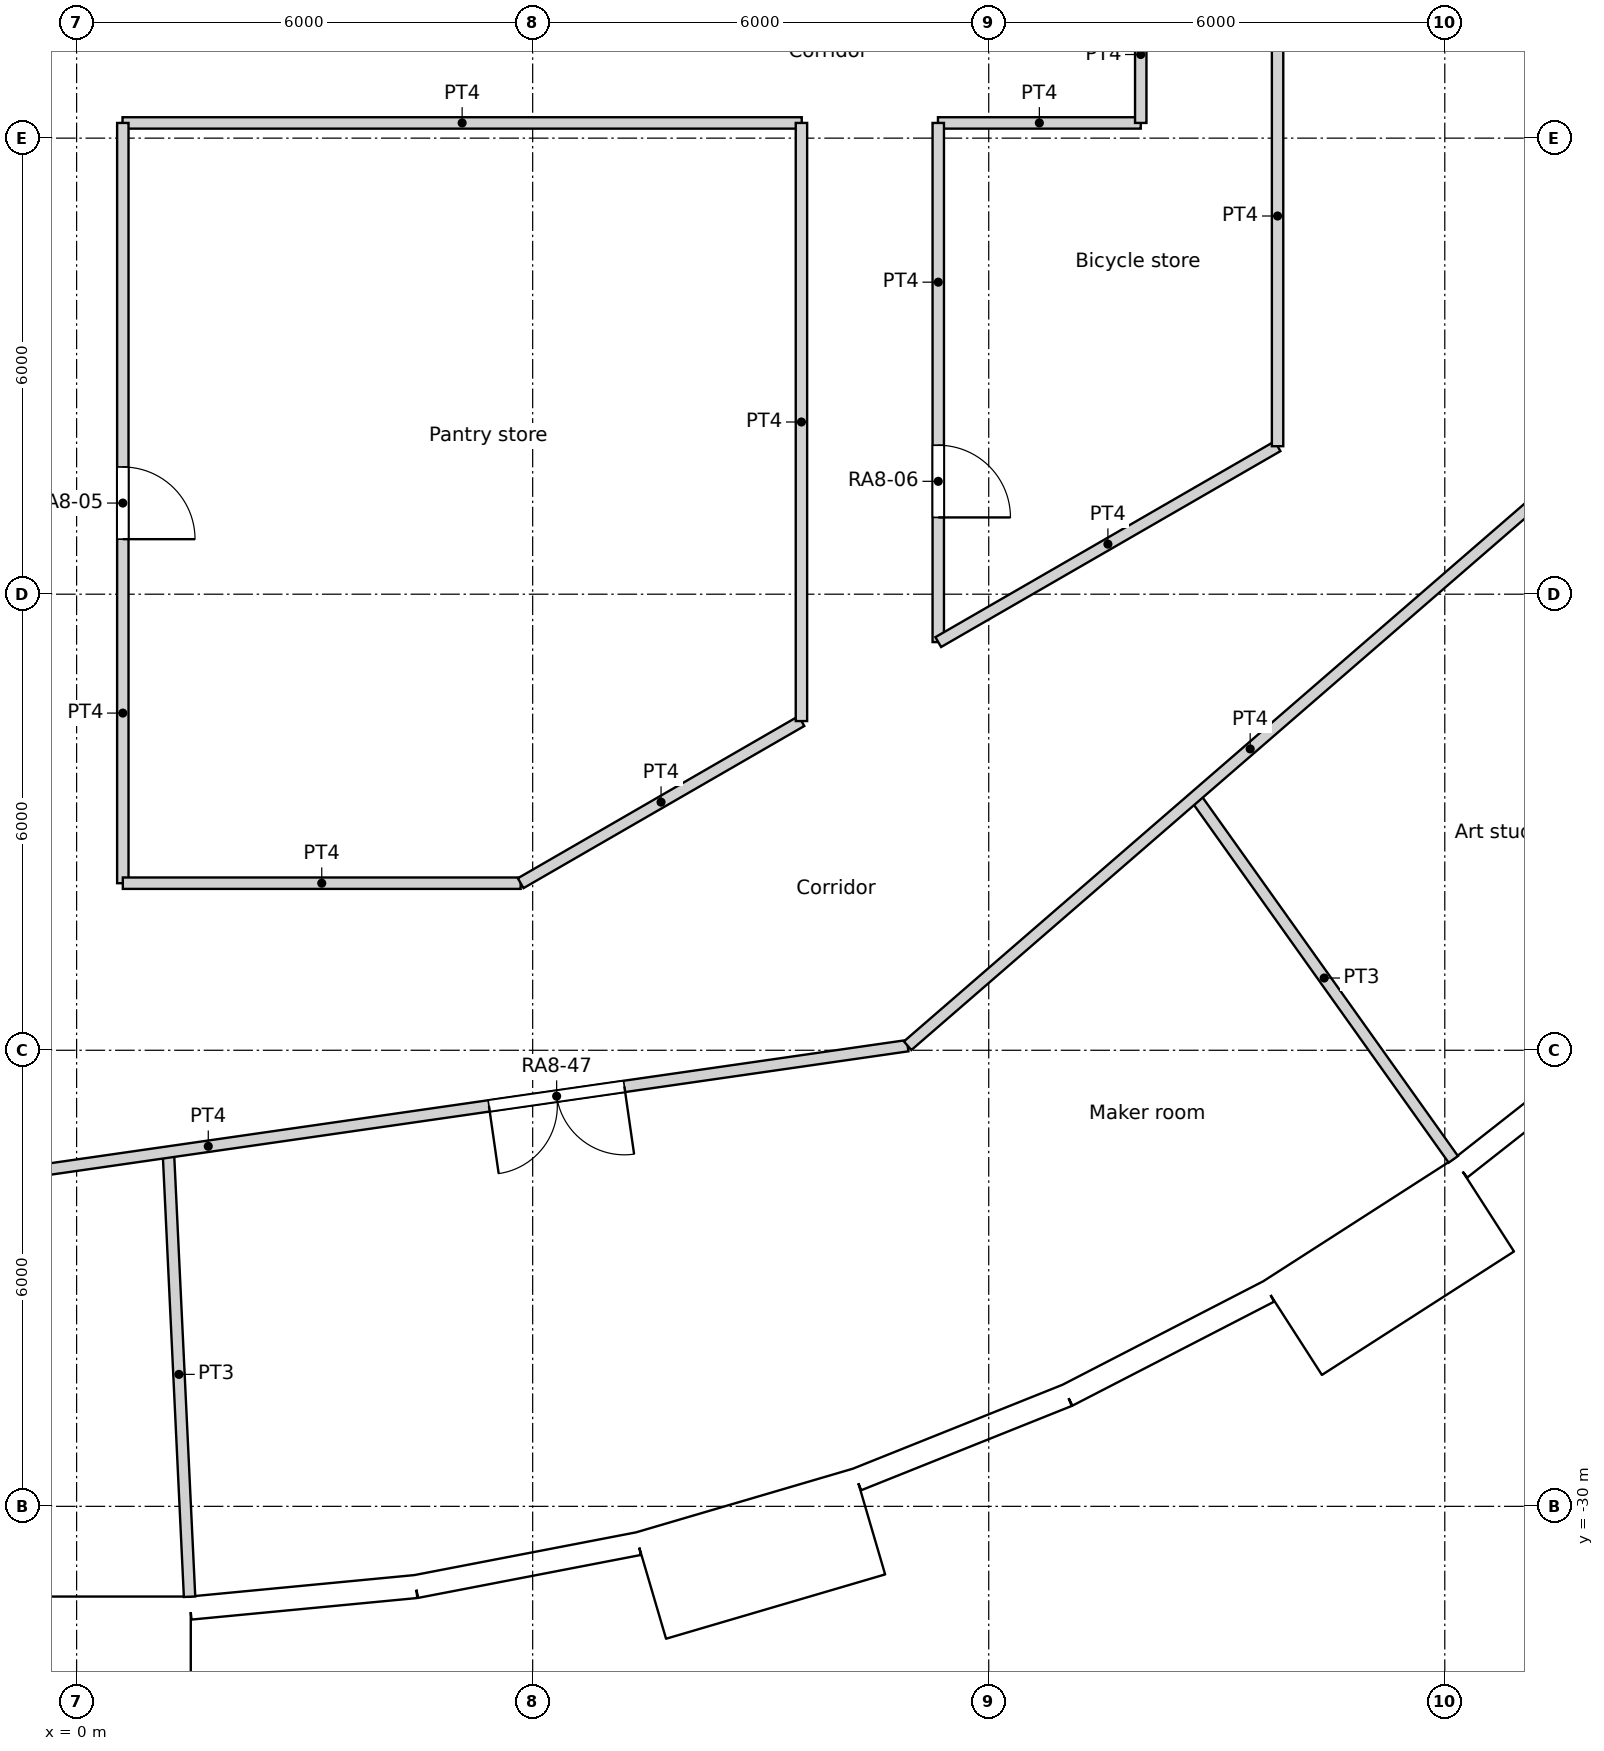
"""IFC4 building model, lengths in metres.
Left out: names, types, materials, properties, quantities, classifications, styles, units other than length and angle.
Written with IfcOpenShell. Run it as: python <this file> out.ifc"""

import sys

from ifc_helpers import new_model, si_unit, direction, frame, frame_2d, origin, origin_2d, place, context, subcontext, project, spatial, rectangle, circle, extrude, element, fill, save


model = new_model("IFC4")
c1 = context("Model", 3, precision=1e-05, world=origin(), true_north=direction((0.0, 1.0)))
c2 = subcontext(c1, "Body", "Model", "MODEL_VIEW")
j1 = project(units=[si_unit("LENGTHUNIT", "METRE"), si_unit("PLANEANGLEUNIT", "RADIAN")], contexts=[c1])
p1 = place(None, origin())
s1 = spatial("IfcSite", under=j1, at=p1, CompositionType="ELEMENT")
p2 = place(p1, origin())
s2 = spatial("IfcBuilding", under=s1, at=p2, CompositionType="ELEMENT")
p3 = place(p2, frame((0.0, 0.0, 103.8)))
s3 = spatial("IfcBuildingStorey", under=s2, at=p3, CompositionType="ELEMENT", Elevation=103.8)
for number, where, z_axis, x_axis in (
    (1, (1.44, -30.24, 0.0), (0.0, 0.0, 1.0), (1.0, 0.0, 0.0)),
    (2, (7.137, -29.421, 0.0), (0.0, 0.0, 1.0), (1.0, 0.0, 0.0)),
    (3, (12.576, -27.539, 0.0), (0.0, 0.0, 1.0), (1.0, 0.0, 0.0)),
    (4, (17.561, -24.661, 0.0), (0.0, 0.0, 1.0), (1.0, 0.0, 0.0)),
):
    element("IfcColumn", number, at=place(p3, frame(where, z_axis=z_axis, x_axis=x_axis)), inside=s3, PredefinedType="COLUMN", context=c2, shape_type="SweptSolid", body=[
        extrude(circle(Radius=0.6, at=origin_2d()), origin(), (0.0, 0.0, 1.0), 3.6),
    ])
for number, where, z_axis, x_axis in (
    (5, (4.263, -24.175, 0.0), (0.0, 0.0, 1.0), (1.0, 0.0, 0.0)),
    (6, (9.723, -22.54, 0.0), (0.0, 0.0, 1.0), (1.0, 0.0, 0.0)),
    (7, (14.659, -19.69, 0.0), (0.0, 0.0, 1.0), (1.0, 0.0, 0.0)),
    (8, (18.805, -15.779, 0.0), (0.0, 0.0, 1.0), (1.0, 0.0, 0.0)),
):
    element("IfcColumn", number, at=place(p3, frame(where, z_axis=z_axis, x_axis=x_axis)), inside=s3, PredefinedType="COLUMN", context=c2, shape_type="SweptSolid", body=[
        extrude(circle(Radius=0.65, at=origin_2d()), origin(), (0.0, 0.0, 1.0), 3.6),
    ])
for number, where, z_axis, x_axis in (
    (9, (1.406, -18.77, 0.0), (0.0, 0.0, 1.0), (1.0, 0.0, 0.0)),
    (10, (6.876, -17.521, 0.0), (0.0, 0.0, 1.0), (1.0, 0.0, 0.0)),
    (11, (11.735, -14.716, 0.0), (0.0, 0.0, 1.0), (1.0, 0.0, 0.0)),
    (12, (15.552, -10.603, 0.0), (0.0, 0.0, 1.0), (1.0, 0.0, 0.0)),
):
    element("IfcColumn", number, at=place(p3, frame(where, z_axis=z_axis, x_axis=x_axis)), inside=s3, PredefinedType="COLUMN", context=c2, shape_type="SweptSolid", body=[
        extrude(circle(Radius=0.7, at=origin_2d()), origin(), (0.0, 0.0, 1.0), 3.6),
    ])
p4 = place(p3, frame((-1.5, -31.914, -0.45), z_axis=(0.0, 0.0, 1.0), x_axis=(1.0, 0.0, 0.0)))
e13 = element("IfcWall", 13, at=p4, inside=s3, PredefinedType="ELEMENTEDWALL", context=c2, shape_type="SweptSolid", body=[
    extrude(rectangle(XDim=3.0, YDim=1.45, at=frame_2d((1.5, 0.0))), origin(), (0.0, 0.0, 1.0), 3.6),
])
p5 = place(p4, frame((1.5, 0.0, 2.0)))
e14 = element("IfcOpeningElement", 14, at=p5, cuts=e13, PredefinedType="OPENING", context=c2, shape_type="SweptSolid", body=[
    extrude(circle(Radius=0.9, at=origin_2d()), frame((0.0, 0.735, 0.0), z_axis=(0.0, -1.0, 0.0), x_axis=(1.0, 0.0, 0.0)), (0.0, 0.0, 1.0), 1.47),
])
p6 = place(p3, frame((1.499, -31.338, 0.0), z_axis=(0.0, 0.0, 1.0), x_axis=(0.995473351551, 0.095041077185, 0.0)))
e15 = element("IfcWall", 15, at=p6, inside=s3, PredefinedType="SOLIDWALL", context=c2, shape_type="SweptSolid", body=[
    extrude(rectangle(XDim=2.98, YDim=0.3, at=frame_2d((1.49, 0.0))), origin(), (0.0, 0.0, 1.0), 3.15),
])
p7 = place(p6, frame((1.49, 0.0, 1.55)))
e16 = element("IfcOpeningElement", 16, at=p7, cuts=e15, PredefinedType="OPENING", context=c2, shape_type="SweptSolid", body=[
    extrude(circle(Radius=0.9, at=origin_2d()), frame((0.0, 0.16, 0.0), z_axis=(0.0, -1.0, 0.0), x_axis=(1.0, 0.0, 0.0)), (0.0, 0.0, 1.0), 0.32),
])
p8 = place(p3, frame((4.465, -31.055, 0.0), z_axis=(0.0, 0.0, 1.0), x_axis=(0.981924535406, 0.189272836848, 0.0)))
e17 = element("IfcWall", 17, at=p8, inside=s3, PredefinedType="SOLIDWALL", context=c2, shape_type="SweptSolid", body=[
    extrude(rectangle(XDim=2.98, YDim=0.3, at=frame_2d((1.49, 0.0))), origin(), (0.0, 0.0, 1.0), 3.15),
])
p9 = place(p8, frame((1.49, 0.0, 1.55)))
e18 = element("IfcOpeningElement", 18, at=p9, cuts=e17, PredefinedType="OPENING", context=c2, shape_type="SweptSolid", body=[
    extrude(circle(Radius=0.9, at=origin_2d()), frame((0.0, 0.16, 0.0), z_axis=(0.0, -1.0, 0.0), x_axis=(1.0, 0.0, 0.0)), (0.0, 0.0, 1.0), 0.32),
])
p10 = place(p3, frame((7.552, -31.044, -0.45), z_axis=(0.0, 0.0, 1.0), x_axis=(0.959489813418, 0.281743319258, 0.0)))
e19 = element("IfcWall", 19, at=p10, inside=s3, PredefinedType="ELEMENTEDWALL", context=c2, shape_type="SweptSolid", body=[
    extrude(rectangle(XDim=3.0, YDim=1.45, at=frame_2d((1.5, 0.0))), origin(), (0.0, 0.0, 1.0), 3.6),
])
p11 = place(p10, frame((1.5, 0.0, 2.0)))
e20 = element("IfcOpeningElement", 20, at=p11, cuts=e19, PredefinedType="OPENING", context=c2, shape_type="SweptSolid", body=[
    extrude(circle(Radius=0.9, at=origin_2d()), frame((0.0, 0.735, 0.0), z_axis=(0.0, -1.0, 0.0), x_axis=(1.0, 0.0, 0.0)), (0.0, 0.0, 1.0), 1.47),
])
p12 = place(p3, frame((10.267, -29.646, 0.0), z_axis=(0.0, 0.0, 1.0), x_axis=(0.928403213937, 0.371574316054, 0.0)))
e21 = element("IfcWall", 21, at=p12, inside=s3, PredefinedType="SOLIDWALL", context=c2, shape_type="SweptSolid", body=[
    extrude(rectangle(XDim=2.98, YDim=0.3, at=frame_2d((1.49, 0.0))), origin(), (0.0, 0.0, 1.0), 3.15),
])
p13 = place(p12, frame((1.49, 0.0, 1.55)))
e22 = element("IfcOpeningElement", 22, at=p13, cuts=e21, PredefinedType="OPENING", context=c2, shape_type="SweptSolid", body=[
    extrude(circle(Radius=0.9, at=origin_2d()), frame((0.0, 0.16, 0.0), z_axis=(0.0, -1.0, 0.0), x_axis=(1.0, 0.0, 0.0)), (0.0, 0.0, 1.0), 0.32),
])
p14 = place(p3, frame((13.033, -28.539, 0.0), z_axis=(0.0, 0.0, 1.0), x_axis=(0.888819853856, 0.458256770153, 0.0)))
e23 = element("IfcWall", 23, at=p14, inside=s3, PredefinedType="SOLIDWALL", context=c2, shape_type="SweptSolid", body=[
    extrude(rectangle(XDim=2.98, YDim=0.3, at=frame_2d((1.49, 0.0))), origin(), (0.0, 0.0, 1.0), 3.15),
])
p15 = place(p14, frame((1.49, 0.0, 1.55)))
e24 = element("IfcOpeningElement", 24, at=p15, cuts=e23, PredefinedType="OPENING", context=c2, shape_type="SweptSolid", body=[
    extrude(circle(Radius=0.9, at=origin_2d()), frame((0.0, 0.16, 0.0), z_axis=(0.0, -1.0, 0.0), x_axis=(1.0, 0.0, 0.0)), (0.0, 0.0, 1.0), 0.32),
])
p16 = place(p3, frame((15.992, -27.659, -0.45), z_axis=(0.0, 0.0, 1.0), x_axis=(0.841223422347, 0.540687667415, 0.0)))
e25 = element("IfcWall", 25, at=p16, inside=s3, PredefinedType="ELEMENTEDWALL", context=c2, shape_type="SweptSolid", body=[
    extrude(rectangle(XDim=3.0, YDim=1.45, at=frame_2d((1.5, 0.0))), origin(), (0.0, 0.0, 1.0), 3.6),
])
p17 = place(p16, frame((1.5, 0.0, 2.0)))
e26 = element("IfcOpeningElement", 26, at=p17, cuts=e25, PredefinedType="OPENING", context=c2, shape_type="SweptSolid", body=[
    extrude(circle(Radius=0.9, at=origin_2d()), frame((0.0, 0.735, 0.0), z_axis=(0.0, -1.0, 0.0), x_axis=(1.0, 0.0, 0.0)), (0.0, 0.0, 1.0), 1.47),
])
p18 = place(p3, frame((18.204, -25.553, 0.0), z_axis=(0.0, 0.0, 1.0), x_axis=(0.786045331304, 0.618168858108, 0.0)))
e27 = element("IfcWall", 27, at=p18, inside=s3, PredefinedType="SOLIDWALL", context=c2, shape_type="SweptSolid", body=[
    extrude(rectangle(XDim=2.98, YDim=0.3, at=frame_2d((1.49, 0.0))), origin(), (0.0, 0.0, 1.0), 3.15),
])
p19 = place(p18, frame((1.49, 0.0, 1.55)))
e28 = element("IfcOpeningElement", 28, at=p19, cuts=e27, PredefinedType="OPENING", context=c2, shape_type="SweptSolid", body=[
    extrude(circle(Radius=0.9, at=origin_2d()), frame((0.0, 0.16, 0.0), z_axis=(0.0, -1.0, 0.0), x_axis=(1.0, 0.0, 0.0)), (0.0, 0.0, 1.0), 0.32),
])
p20 = place(p3, frame((0.604, -11.8, 0.0), z_axis=(0.0, 0.0, 1.0), x_axis=(1.0, 0.0, 0.0)))
e29 = element("IfcWall", 29, at=p20, inside=s3, PredefinedType="PARTITIONING", context=c2, shape_type="SweptSolid", body=[
    extrude(rectangle(XDim=8.936, YDim=0.15, at=frame_2d((4.468, 0.0))), origin(), (0.0, 0.0, 1.0), 3.15),
])
p21 = place(p3, frame((14.0, -11.8, 0.0), z_axis=(0.0, 0.0, 1.0), x_axis=(0.0, 1.0, 0.0)))
e30 = element("IfcWall", 30, at=p21, inside=s3, PredefinedType="PARTITIONING", context=c2, shape_type="SweptSolid", body=[
    extrude(rectangle(XDim=1.8, YDim=0.15, at=frame_2d((0.9, 0.0))), origin(), (0.0, 0.0, 1.0), 3.15),
])
p22 = place(p3, frame((11.332, -11.8, 0.0), z_axis=(0.0, 0.0, 1.0), x_axis=(1.0, 0.0, 0.0)))
e31 = element("IfcWall", 31, at=p22, inside=s3, PredefinedType="PARTITIONING", context=c2, shape_type="SweptSolid", body=[
    extrude(rectangle(XDim=2.668, YDim=0.15, at=frame_2d((1.334, 0.0))), origin(), (0.0, 0.0, 1.0), 3.15),
])
p23 = place(p3, frame((15.8, -16.053, 0.0), z_axis=(0.0, 0.0, 1.0), x_axis=(0.0, 1.0, 0.0)))
e32 = element("IfcWall", 32, at=p23, inside=s3, PredefinedType="PARTITIONING", context=c2, shape_type="SweptSolid", body=[
    extrude(rectangle(XDim=6.057, YDim=0.15, at=frame_2d((3.028, 0.0))), origin(), (0.0, 0.0, 1.0), 3.15),
])
p24 = place(p3, frame((10.933, -23.94, 0.0), z_axis=(0.0, 0.0, 1.0), x_axis=(0.755770011705, 0.654837147242, 0.0)))
e33 = element("IfcWall", 33, at=p24, inside=s3, PredefinedType="PARTITIONING", context=c2, shape_type="SweptSolid", body=[
    extrude(rectangle(XDim=14.83, YDim=0.15, at=frame_2d((7.415, 0.0))), origin(), (0.0, 0.0, 1.0), 3.15),
])
p25 = place(p24, frame((11.976, 0.0, 0.0)))
e34 = element("IfcOpeningElement", 34, at=p25, cuts=e33, PredefinedType="OPENING", context=c2, shape_type="SweptSolid", body=[
    extrude(rectangle(XDim=1.8, YDim=2.1, at=frame_2d((0.9, 1.05))), frame((0.0, 0.075, 0.0), z_axis=(0.0, -1.0, 0.0), x_axis=(1.0, 0.0, 0.0)), (0.0, 0.0, 1.0), 0.15),
])
p26 = place(p3, frame((0.608, -21.802, 0.0), z_axis=(0.0, 0.0, 1.0), x_axis=(0.0, 1.0, 0.0)))
e35 = element("IfcWall", 35, at=p26, inside=s3, PredefinedType="PARTITIONING", context=c2, shape_type="SweptSolid", body=[
    extrude(rectangle(XDim=10.002, YDim=0.15, at=frame_2d((5.001, 0.0))), origin(), (0.0, 0.0, 1.0), 3.15),
])
p27 = place(p26, frame((4.526, 0.0, 0.0)))
e36 = element("IfcOpeningElement", 36, at=p27, cuts=e35, PredefinedType="OPENING", context=c2, shape_type="SweptSolid", body=[
    extrude(rectangle(XDim=0.95, YDim=2.1, at=frame_2d((0.475, 1.05))), frame((0.0, 0.075, 0.0), z_axis=(0.0, -1.0, 0.0), x_axis=(1.0, 0.0, 0.0)), (0.0, 0.0, 1.0), 0.15),
])
p28 = place(p3, frame((0.608, -21.802, 0.0), z_axis=(0.0, 0.0, 1.0), x_axis=(1.0, 0.0, 0.0)))
e37 = element("IfcWall", 37, at=p28, inside=s3, PredefinedType="PARTITIONING", context=c2, shape_type="SweptSolid", body=[
    extrude(rectangle(XDim=5.234, YDim=0.15, at=frame_2d((2.617, 0.0))), origin(), (0.0, 0.0, 1.0), 3.15),
])
p29 = place(p3, frame((5.842, -21.802, 0.0), z_axis=(0.0, 0.0, 1.0), x_axis=(0.865983505205, 0.500072563448, 0.0)))
e38 = element("IfcWall", 38, at=p29, inside=s3, PredefinedType="PARTITIONING", context=c2, shape_type="SweptSolid", body=[
    extrude(rectangle(XDim=4.265, YDim=0.15, at=frame_2d((2.133, 0.0))), origin(), (0.0, 0.0, 1.0), 3.15),
])
p30 = place(p3, frame((9.536, -19.669, 0.0), z_axis=(0.0, 0.0, 1.0), x_axis=(0.0, 1.0, 0.0)))
e39 = element("IfcWall", 39, at=p30, inside=s3, PredefinedType="PARTITIONING", context=c2, shape_type="SweptSolid", body=[
    extrude(rectangle(XDim=7.869, YDim=0.15, at=frame_2d((3.935, 0.0))), origin(), (0.0, 0.0, 1.0), 3.15),
])
p31 = place(p3, frame((11.336, -18.63, 0.0), z_axis=(0.0, 0.0, 1.0), x_axis=(0.0, 1.0, 0.0)))
e40 = element("IfcWall", 40, at=p31, inside=s3, PredefinedType="PARTITIONING", context=c2, shape_type="SweptSolid", body=[
    extrude(rectangle(XDim=6.83, YDim=0.15, at=frame_2d((3.415, 0.0))), origin(), (0.0, 0.0, 1.0), 3.15),
])
p32 = place(p31, frame((1.64, 0.0, 0.0)))
e41 = element("IfcOpeningElement", 41, at=p32, cuts=e40, PredefinedType="OPENING", context=c2, shape_type="SweptSolid", body=[
    extrude(rectangle(XDim=0.95, YDim=2.1, at=frame_2d((0.475, 1.05))), frame((0.0, 0.075, 0.0), z_axis=(0.0, -1.0, 0.0), x_axis=(1.0, 0.0, 0.0)), (0.0, 0.0, 1.0), 0.15),
])
p33 = place(p3, frame((11.336, -18.63, 0.0), z_axis=(0.0, 0.0, 1.0), x_axis=(0.866063337164, 0.499934291702, 0.0)))
e42 = element("IfcWall", 42, at=p33, inside=s3, PredefinedType="PARTITIONING", context=c2, shape_type="SweptSolid", body=[
    extrude(rectangle(XDim=5.155, YDim=0.15, at=frame_2d((2.577, 0.0))), origin(), (0.0, 0.0, 1.0), 3.15),
])
p34 = place(p3, frame((-3.746, -26.051, 0.0), z_axis=(0.0, 0.0, 1.0), x_axis=(0.9898137179, 0.142368549395, 0.0)))
e43 = element("IfcWall", 43, at=p34, inside=s3, PredefinedType="PARTITIONING", context=c2, shape_type="SweptSolid", body=[
    extrude(rectangle(XDim=14.83, YDim=0.15, at=frame_2d((7.415, 0.0))), origin(), (0.0, 0.0, 1.0), 3.15),
])
p35 = place(p34, frame((0.804, 0.0, 0.0)))
e44 = element("IfcOpeningElement", 44, at=p35, cuts=e43, PredefinedType="OPENING", context=c2, shape_type="SweptSolid", body=[
    extrude(rectangle(XDim=1.0, YDim=2.04, at=frame_2d((0.5, 1.02))), frame((0.0, 0.075, 0.0), z_axis=(0.0, -1.0, 0.0), x_axis=(1.0, 0.0, 0.0)), (0.0, 0.0, 1.0), 0.15),
])
p36 = place(p34, frame((9.265, 0.0, 0.0)))
e45 = element("IfcOpeningElement", 45, at=p36, cuts=e43, PredefinedType="OPENING", context=c2, shape_type="SweptSolid", body=[
    extrude(rectangle(XDim=1.8, YDim=2.1, at=frame_2d((0.9, 1.05))), frame((0.0, 0.075, 0.0), z_axis=(0.0, -1.0, 0.0), x_axis=(1.0, 0.0, 0.0)), (0.0, 0.0, 1.0), 0.15),
])
p37 = place(p3, frame((1.207, -25.339, 0.0), z_axis=(0.0, 0.0, 1.0), x_axis=(0.047648334785, -0.998864173045, 0.0)))
e46 = element("IfcWall", 46, at=p37, inside=s3, PredefinedType="PARTITIONING", context=c2, shape_type="SweptSolid", body=[
    extrude(rectangle(XDim=5.856, YDim=0.15, at=frame_2d((2.928, 0.0))), origin(), (0.0, 0.0, 1.0), 3.15),
])
p38 = place(p3, frame((14.715, -20.664, 0.0), z_axis=(0.0, 0.0, 1.0), x_axis=(0.580007254017, -0.814611309329, 0.0)))
e47 = element("IfcWall", 47, at=p38, inside=s3, PredefinedType="PARTITIONING", context=c2, shape_type="SweptSolid", body=[
    extrude(rectangle(XDim=5.857, YDim=0.15, at=frame_2d((2.928, 0.0))), origin(), (0.0, 0.0, 1.0), 3.15),
])
p39 = place(p5, origin())
e48 = element("IfcWindow", 48, at=p39, inside=s3, PartitioningType="SINGLE_PANEL", PredefinedType="WINDOW", context=c2, shape_type="SweptSolid", body=[
    extrude(circle(Radius=0.9, at=origin_2d()), frame((0.0, 0.695, 0.0), z_axis=(0.0, -1.0, 0.0), x_axis=(1.0, 0.0, 0.0)), (0.0, 0.0, 1.0), 0.1),
])
fill(e14, e48)
p40 = place(p7, origin())
e49 = element("IfcWindow", 49, at=p40, inside=s3, PartitioningType="SINGLE_PANEL", PredefinedType="WINDOW", context=c2, shape_type="SweptSolid", body=[
    extrude(circle(Radius=0.9, at=origin_2d()), frame((0.0, 0.12, 0.0), z_axis=(0.0, -1.0, 0.0), x_axis=(1.0, 0.0, 0.0)), (0.0, 0.0, 1.0), 0.1),
])
fill(e16, e49)
p41 = place(p9, origin())
e50 = element("IfcWindow", 50, at=p41, inside=s3, PartitioningType="SINGLE_PANEL", PredefinedType="WINDOW", context=c2, shape_type="SweptSolid", body=[
    extrude(circle(Radius=0.9, at=origin_2d()), frame((0.0, 0.12, 0.0), z_axis=(0.0, -1.0, 0.0), x_axis=(1.0, 0.0, 0.0)), (0.0, 0.0, 1.0), 0.1),
])
fill(e18, e50)
p42 = place(p11, origin())
e51 = element("IfcWindow", 51, at=p42, inside=s3, PartitioningType="SINGLE_PANEL", PredefinedType="WINDOW", context=c2, shape_type="SweptSolid", body=[
    extrude(circle(Radius=0.9, at=origin_2d()), frame((0.0, 0.695, 0.0), z_axis=(0.0, -1.0, 0.0), x_axis=(1.0, 0.0, 0.0)), (0.0, 0.0, 1.0), 0.1),
])
fill(e20, e51)
p43 = place(p13, origin())
e52 = element("IfcWindow", 52, at=p43, inside=s3, PartitioningType="SINGLE_PANEL", PredefinedType="WINDOW", context=c2, shape_type="SweptSolid", body=[
    extrude(circle(Radius=0.9, at=origin_2d()), frame((0.0, 0.12, 0.0), z_axis=(0.0, -1.0, 0.0), x_axis=(1.0, 0.0, 0.0)), (0.0, 0.0, 1.0), 0.1),
])
fill(e22, e52)
p44 = place(p15, origin())
e53 = element("IfcWindow", 53, at=p44, inside=s3, PartitioningType="SINGLE_PANEL", PredefinedType="WINDOW", context=c2, shape_type="SweptSolid", body=[
    extrude(circle(Radius=0.9, at=origin_2d()), frame((0.0, 0.12, 0.0), z_axis=(0.0, -1.0, 0.0), x_axis=(1.0, 0.0, 0.0)), (0.0, 0.0, 1.0), 0.1),
])
fill(e24, e53)
p45 = place(p17, origin())
e54 = element("IfcWindow", 54, at=p45, inside=s3, PartitioningType="SINGLE_PANEL", PredefinedType="WINDOW", context=c2, shape_type="SweptSolid", body=[
    extrude(circle(Radius=0.9, at=origin_2d()), frame((0.0, 0.695, 0.0), z_axis=(0.0, -1.0, 0.0), x_axis=(1.0, 0.0, 0.0)), (0.0, 0.0, 1.0), 0.1),
])
fill(e26, e54)
p46 = place(p19, origin())
e55 = element("IfcWindow", 55, at=p46, inside=s3, PartitioningType="SINGLE_PANEL", PredefinedType="WINDOW", context=c2, shape_type="SweptSolid", body=[
    extrude(circle(Radius=0.9, at=origin_2d()), frame((0.0, 0.12, 0.0), z_axis=(0.0, -1.0, 0.0), x_axis=(1.0, 0.0, 0.0)), (0.0, 0.0, 1.0), 0.1),
])
fill(e28, e55)
p47 = place(p27, origin())
e56 = element("IfcDoor", 56, at=p47, inside=s3, OperationType="SINGLE_SWING_RIGHT", PredefinedType="DOOR", context=c2, shape_type="SweptSolid", body=[
    extrude(rectangle(XDim=0.95, YDim=2.1, at=frame_2d((0.475, 1.05))), frame((0.0, 0.025, 0.0), z_axis=(0.0, -1.0, 0.0), x_axis=(1.0, 0.0, 0.0)), (0.0, 0.0, 1.0), 0.05),
])
fill(e36, e56)
p48 = place(p32, origin())
e57 = element("IfcDoor", 57, at=p48, inside=s3, OperationType="SINGLE_SWING_RIGHT", PredefinedType="DOOR", context=c2, shape_type="SweptSolid", body=[
    extrude(rectangle(XDim=0.95, YDim=2.1, at=frame_2d((0.475, 1.05))), frame((0.0, 0.025, 0.0), z_axis=(0.0, -1.0, 0.0), x_axis=(1.0, 0.0, 0.0)), (0.0, 0.0, 1.0), 0.05),
])
fill(e41, e57)
p49 = place(p36, origin())
e58 = element("IfcDoor", 58, at=p49, inside=s3, OperationType="DOUBLE_DOOR_SINGLE_SWING", PredefinedType="DOOR", context=c2, shape_type="SweptSolid", body=[
    extrude(rectangle(XDim=1.8, YDim=2.1, at=frame_2d((0.9, 1.05))), frame((0.0, 0.025, 0.0), z_axis=(0.0, -1.0, 0.0), x_axis=(1.0, 0.0, 0.0)), (0.0, 0.0, 1.0), 0.05),
])
fill(e45, e58)
save(model, sys.argv[1])
